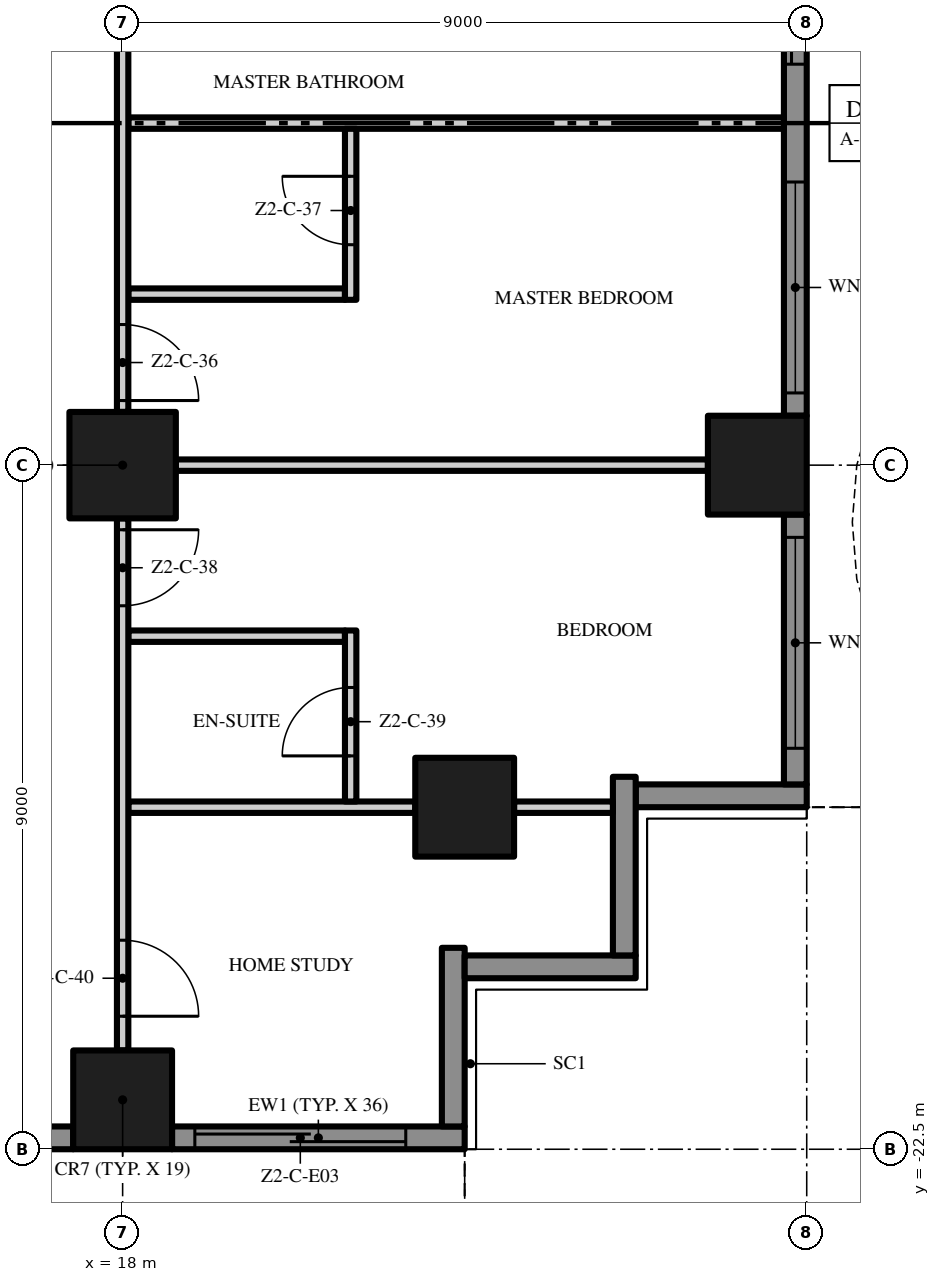
"""IFC4 building model, lengths in metres.
Left out: names, types, materials, properties, quantities, classifications, styles, units other than length and angle.
Written with IfcOpenShell. Run it as: python <this file> out.ifc"""

import sys

from ifc_helpers import new_model, si_unit, direction, frame, frame_2d, origin, origin_2d, place, context, subcontext, project, spatial, polyline, rectangle, outline, extrude, element, fill, save


model = new_model("IFC4")
c1 = context("Model", 3, precision=1e-05, world=origin(), true_north=direction((0.0, 1.0)))
c2 = subcontext(c1, "Body", "Model", "MODEL_VIEW")
j1 = project(units=[si_unit("LENGTHUNIT", "METRE"), si_unit("PLANEANGLEUNIT", "RADIAN")], contexts=[c1])
p1 = place(None, origin())
s1 = spatial("IfcSite", under=j1, at=p1, CompositionType="ELEMENT")
p2 = place(p1, origin())
s2 = spatial("IfcBuilding", under=s1, at=p2, CompositionType="ELEMENT")
p3 = place(p2, frame((0.0, 0.0, 92.2)))
s3 = spatial("IfcBuildingStorey", under=s2, at=p3, CompositionType="ELEMENT", Elevation=92.2)
p4 = place(p3, frame((18.0, -13.5, 0.0), z_axis=(0.0, 0.0, 1.0), x_axis=(1.0, 0.0, 0.0)))
e1 = element("IfcColumn", 1, at=p4, inside=s3, PredefinedType="COLUMN", context=c2, shape_type="SweptSolid", body=[
    extrude(rectangle(XDim=1.4, YDim=1.4, at=origin_2d()), origin(), (0.0, 0.0, 1.0), 3.5),
])
for number, where, z_axis, x_axis in (
    (2, (18.0, -21.85, 0.0), (0.0, 0.0, 1.0), (1.0, 0.0, 0.0)),
    (3, (26.35, -13.5, 0.0), (0.0, 0.0, 1.0), (1.0, 0.0, 0.0)),
    (4, (22.5, -18.0, 0.0), (0.0, 0.0, 1.0), (1.0, 0.0, 0.0)),
):
    element("IfcColumn", number, at=place(p3, frame(where, z_axis=z_axis, x_axis=x_axis)), inside=s3, PredefinedType="COLUMN", context=c2, shape_type="SweptSolid", body=[
        extrude(rectangle(XDim=1.3, YDim=1.3, at=origin_2d()), origin(), (0.0, 0.0, 1.0), 3.5),
    ])
p5 = place(p3, frame((17.35, -22.35, 0.0), z_axis=(0.0, 0.0, 1.0), x_axis=(-1.0, 0.0, 0.0)))
e5 = element("IfcWall", 5, at=p5, inside=s3, PredefinedType="SOLIDWALL", context=c2, shape_type="SweptSolid", body=[
    extrude(rectangle(XDim=7.7, YDim=0.3, at=frame_2d((3.85, 0.0))), origin(), (0.0, 0.0, 1.0), 3.5),
])
p6 = place(p5, frame((4.625, 0.0, 0.45)))
e6 = element("IfcOpeningElement", 6, at=p6, cuts=e5, PredefinedType="OPENING", context=c2, shape_type="SweptSolid", body=[
    extrude(rectangle(XDim=2.775, YDim=2.65, at=frame_2d((1.387, 1.325))), frame((0.0, 0.16, 0.0), z_axis=(0.0, -1.0, 0.0), x_axis=(1.0, 0.0, 0.0)), (0.0, 0.0, 1.0), 0.32),
])
p7 = place(p5, frame((0.3, 0.0, 0.45)))
e7 = element("IfcOpeningElement", 7, at=p7, cuts=e5, PredefinedType="OPENING", context=c2, shape_type="SweptSolid", body=[
    extrude(rectangle(XDim=2.775, YDim=2.65, at=frame_2d((1.387, 1.325))), frame((0.0, 0.16, 0.0), z_axis=(0.0, -1.0, 0.0), x_axis=(1.0, 0.0, 0.0)), (0.0, 0.0, 1.0), 0.32),
])
p8 = place(p3, frame((22.5, -22.35, 0.0), z_axis=(0.0, 0.0, 1.0), x_axis=(-1.0, 0.0, 0.0)))
e8 = element("IfcWall", 8, at=p8, inside=s3, PredefinedType="SOLIDWALL", context=c2, shape_type="SweptSolid", body=[
    extrude(rectangle(XDim=3.85, YDim=0.3, at=frame_2d((1.925, 0.0))), origin(), (0.0, 0.0, 1.0), 3.5),
])
p9 = place(p8, frame((0.775, 0.0, 0.0)))
e9 = element("IfcOpeningElement", 9, at=p9, cuts=e8, PredefinedType="OPENING", context=c2, shape_type="SweptSolid", body=[
    extrude(rectangle(XDim=2.775, YDim=2.4, at=frame_2d((1.387, 1.2))), frame((0.0, 0.16, 0.0), z_axis=(0.0, -1.0, 0.0), x_axis=(1.0, 0.0, 0.0)), (0.0, 0.0, 1.0), 0.32),
])
p10 = place(p3, frame((22.35, -19.85, 0.0), z_axis=(0.0, 0.0, 1.0), x_axis=(0.0, -1.0, 0.0)))
e10 = element("IfcWall", 10, at=p10, inside=s3, PredefinedType="SOLIDWALL", context=c2, shape_type="SweptSolid", body=[
    extrude(rectangle(XDim=2.35, YDim=0.3, at=frame_2d((1.175, 0.0))), origin(), (0.0, 0.0, 1.0), 3.5),
])
p11 = place(p3, frame((24.75, -20.1, 0.0), z_axis=(0.0, 0.0, 1.0), x_axis=(-1.0, 0.0, 0.0)))
e11 = element("IfcWall", 11, at=p11, inside=s3, PredefinedType="SOLIDWALL", context=c2, shape_type="SweptSolid", body=[
    extrude(rectangle(XDim=2.25, YDim=0.3, at=frame_2d((1.125, 0.0))), origin(), (0.0, 0.0, 1.0), 3.5),
])
p12 = place(p3, frame((24.6, -17.6, 0.0), z_axis=(0.0, 0.0, 1.0), x_axis=(0.0, -1.0, 0.0)))
e12 = element("IfcWall", 12, at=p12, inside=s3, PredefinedType="SOLIDWALL", context=c2, shape_type="SweptSolid", body=[
    extrude(rectangle(XDim=2.35, YDim=0.3, at=frame_2d((1.175, 0.0))), origin(), (0.0, 0.0, 1.0), 3.5),
])
p13 = place(p3, frame((27.0, -17.85, 0.0), z_axis=(0.0, 0.0, 1.0), x_axis=(-1.0, 0.0, 0.0)))
e13 = element("IfcWall", 13, at=p13, inside=s3, PredefinedType="SOLIDWALL", context=c2, shape_type="SweptSolid", body=[
    extrude(rectangle(XDim=2.25, YDim=0.3, at=frame_2d((1.125, 0.0))), origin(), (0.0, 0.0, 1.0), 3.5),
])
p14 = place(p3, frame((26.85, -14.15, 0.0), z_axis=(0.0, 0.0, 1.0), x_axis=(0.0, -1.0, 0.0)))
e14 = element("IfcWall", 14, at=p14, inside=s3, PredefinedType="SOLIDWALL", context=c2, shape_type="SweptSolid", body=[
    extrude(rectangle(XDim=3.55, YDim=0.3, at=frame_2d((1.775, 0.0))), origin(), (0.0, 0.0, 1.0), 3.5),
])
p15 = place(p14, frame((0.3, 0.0, 0.45)))
e15 = element("IfcOpeningElement", 15, at=p15, cuts=e14, PredefinedType="OPENING", context=c2, shape_type="SweptSolid", body=[
    extrude(rectangle(XDim=2.775, YDim=2.65, at=frame_2d((1.387, 1.325))), frame((0.0, 0.16, 0.0), z_axis=(0.0, -1.0, 0.0), x_axis=(1.0, 0.0, 0.0)), (0.0, 0.0, 1.0), 0.32),
])
p16 = place(p3, frame((26.85, -5.15, 0.0), z_axis=(0.0, 0.0, 1.0), x_axis=(0.0, -1.0, 0.0)))
e16 = element("IfcWall", 16, at=p16, inside=s3, PredefinedType="SOLIDWALL", context=c2, shape_type="SweptSolid", body=[
    extrude(rectangle(XDim=7.7, YDim=0.3, at=frame_2d((3.85, 0.0))), origin(), (0.0, 0.0, 1.0), 3.5),
])
p17 = place(p16, frame((4.625, 0.0, 0.45)))
e17 = element("IfcOpeningElement", 17, at=p17, cuts=e16, PredefinedType="OPENING", context=c2, shape_type="SweptSolid", body=[
    extrude(rectangle(XDim=2.775, YDim=2.65, at=frame_2d((1.387, 1.325))), frame((0.0, 0.16, 0.0), z_axis=(0.0, -1.0, 0.0), x_axis=(1.0, 0.0, 0.0)), (0.0, 0.0, 1.0), 0.32),
])
p18 = place(p16, frame((0.3, 0.0, 0.0)))
e18 = element("IfcOpeningElement", 18, at=p18, cuts=e16, PredefinedType="OPENING", context=c2, shape_type="SweptSolid", body=[
    extrude(rectangle(XDim=2.775, YDim=2.4, at=frame_2d((1.387, 1.2))), frame((0.0, 0.16, 0.0), z_axis=(0.0, -1.0, 0.0), x_axis=(1.0, 0.0, 0.0)), (0.0, 0.0, 1.0), 0.32),
])
p19 = place(p3, origin())
e19 = element("IfcWall", 19, at=p19, inside=s3, PredefinedType="USERDEFINED", context=c2, shape_type="SweptSolid", body=[
    extrude(outline(polyline([(-22.5, -24.3), (-21.0, -23.595), (-19.5, -23.159), (-18.75, -23.1), (-18.0, -23.159), (-16.5, -23.595), (-15.0, -24.3), (-13.5, -25.005), (-12.0, -25.441), (-11.25, -25.5), (-10.5, -25.441), (-9.0, -25.005), (-7.5, -24.3), (-6.0, -23.595), (-4.5, -23.159), (-3.75, -23.1), (-3.0, -23.159), (-1.5, -23.595), (0.0, -24.3), (1.5, -25.005), (3.0, -25.441), (3.75, -25.5), (4.5, -25.441), (6.0, -25.005), (7.5, -24.3), (9.0, -23.595), (10.5, -23.159), (11.25, -23.1), (12.0, -23.159), (13.5, -23.595), (15.0, -24.3), (16.5, -25.005), (18.0, -25.441), (18.75, -25.5), (19.5, -25.441), (21.0, -25.005), (22.5, -24.3), (22.394, -24.074), (20.911, -24.771), (19.455, -25.194), (18.75, -25.249), (18.045, -25.194), (16.589, -24.771), (15.106, -24.074), (13.589, -23.36), (12.045, -22.911), (11.25, -22.849), (10.455, -22.911), (8.911, -23.36), (7.394, -24.074), (5.911, -24.771), (4.455, -25.194), (3.75, -25.249), (3.045, -25.194), (1.589, -24.771), (0.106, -24.074), (-1.411, -23.36), (-2.955, -22.911), (-3.75, -22.849), (-4.545, -22.911), (-6.089, -23.36), (-7.606, -24.074), (-9.089, -24.771), (-10.545, -25.194), (-11.25, -25.249), (-11.955, -25.194), (-13.411, -24.771), (-14.894, -24.074), (-16.411, -23.36), (-17.955, -22.911), (-18.75, -22.849), (-19.545, -22.911), (-21.089, -23.36), (-22.606, -24.074), (-22.5, -24.3)])), origin(), (0.0, 0.0, 1.0), 0.9),
])
p20 = place(p3, origin())
e20 = element("IfcWall", 20, at=p20, inside=s3, PredefinedType="USERDEFINED", context=c2, shape_type="SweptSolid", body=[
    extrude(outline(polyline([(28.8, -18.0), (28.095, -16.5), (27.659, -15.0), (27.6, -14.25), (27.659, -13.5), (28.095, -12.0), (28.8, -10.5), (29.505, -9.0), (29.941, -7.5), (30.0, -6.75), (29.941, -6.0), (29.505, -4.5), (28.8, -3.0), (28.095, -1.5), (27.659, 0.0), (27.6, 0.75), (27.659, 1.5), (28.095, 3.0), (28.8, 4.5), (29.505, 6.0), (29.941, 7.5), (30.0, 8.25), (29.941, 9.0), (29.505, 10.5), (28.8, 12.0), (28.095, 13.5), (27.659, 15.0), (27.6, 15.75), (27.659, 16.5), (28.095, 18.0), (27.855, 18.07), (27.411, 16.545), (27.349, 15.75), (27.411, 14.955), (27.86, 13.411), (28.574, 11.894), (29.271, 10.411), (29.694, 8.955), (29.749, 8.25), (29.694, 7.545), (29.271, 6.089), (28.574, 4.606), (27.86, 3.089), (27.411, 1.545), (27.349, 0.75), (27.411, -0.045), (27.86, -1.589), (28.574, -3.106), (29.271, -4.589), (29.694, -6.045), (29.749, -6.75), (29.694, -7.455), (29.271, -8.911), (28.574, -10.394), (27.86, -11.911), (27.411, -13.455), (27.349, -14.25), (27.411, -15.045), (27.86, -16.589), (28.574, -18.106), (28.8, -18.0)])), origin(), (0.0, 0.0, 1.0), 0.9),
])
p21 = place(p3, frame((18.075, -18.0, 0.0), z_axis=(0.0, 0.0, 1.0), x_axis=(1.0, 0.0, 0.0)))
e21 = element("IfcWall", 21, at=p21, inside=s3, PredefinedType="PARTITIONING", context=c2, shape_type="SweptSolid", body=[
    extrude(rectangle(XDim=3.775, YDim=0.15, at=frame_2d((1.887, 0.0))), origin(), (0.0, 0.0, 1.0), 3.5),
])
p22 = place(p3, frame((23.15, -18.0, 0.0), z_axis=(0.0, 0.0, 1.0), x_axis=(1.0, 0.0, 0.0)))
e22 = element("IfcWall", 22, at=p22, inside=s3, PredefinedType="PARTITIONING", context=c2, shape_type="SweptSolid", body=[
    extrude(rectangle(XDim=1.3, YDim=0.15, at=frame_2d((0.65, 0.0))), origin(), (0.0, 0.0, 1.0), 3.5),
])
p23 = place(p3, frame((18.075, -15.75, 0.0), z_axis=(0.0, 0.0, 1.0), x_axis=(1.0, 0.0, 0.0)))
e23 = element("IfcWall", 23, at=p23, inside=s3, PredefinedType="PARTITIONING", context=c2, shape_type="SweptSolid", body=[
    extrude(rectangle(XDim=2.85, YDim=0.15, at=frame_2d((1.425, 0.0))), origin(), (0.0, 0.0, 1.0), 3.5),
])
p24 = place(p3, frame((18.7, -13.5, 0.0), z_axis=(0.0, 0.0, 1.0), x_axis=(1.0, 0.0, 0.0)))
e24 = element("IfcWall", 24, at=p24, inside=s3, PredefinedType="PARTITIONING", context=c2, shape_type="SweptSolid", body=[
    extrude(rectangle(XDim=7.0, YDim=0.15, at=frame_2d((3.5, 0.0))), origin(), (0.0, 0.0, 1.0), 3.5),
])
p25 = place(p3, frame((18.075, -11.25, 0.0), z_axis=(0.0, 0.0, 1.0), x_axis=(1.0, 0.0, 0.0)))
e25 = element("IfcWall", 25, at=p25, inside=s3, PredefinedType="PARTITIONING", context=c2, shape_type="SweptSolid", body=[
    extrude(rectangle(XDim=2.85, YDim=0.15, at=frame_2d((1.425, 0.0))), origin(), (0.0, 0.0, 1.0), 3.5),
])
p26 = place(p3, frame((18.075, -9.0, 0.0), z_axis=(0.0, 0.0, 1.0), x_axis=(1.0, 0.0, 0.0)))
e26 = element("IfcWall", 26, at=p26, inside=s3, PredefinedType="PARTITIONING", context=c2, shape_type="SweptSolid", body=[
    extrude(rectangle(XDim=8.625, YDim=0.15, at=frame_2d((4.312, 0.0))), origin(), (0.0, 0.0, 1.0), 3.5),
])
p27 = place(p3, frame((18.0, -14.2, 0.0), z_axis=(0.0, 0.0, 1.0), x_axis=(0.0, -1.0, 0.0)))
e27 = element("IfcWall", 27, at=p27, inside=s3, PredefinedType="PARTITIONING", context=c2, shape_type="SweptSolid", body=[
    extrude(rectangle(XDim=7.0, YDim=0.15, at=frame_2d((3.5, 0.0))), origin(), (0.0, 0.0, 1.0), 3.5),
])
p28 = place(p27, frame((0.15, 0.0, 0.0)))
e28 = element("IfcOpeningElement", 28, at=p28, cuts=e27, PredefinedType="OPENING", context=c2, shape_type="SweptSolid", body=[
    extrude(rectangle(XDim=1.0, YDim=2.4, at=frame_2d((0.5, 1.2))), frame((0.0, 0.085, 0.0), z_axis=(0.0, -1.0, 0.0), x_axis=(1.0, 0.0, 0.0)), (0.0, 0.0, 1.0), 0.17),
])
p29 = place(p27, frame((5.55, 0.0, 0.0)))
e29 = element("IfcOpeningElement", 29, at=p29, cuts=e27, PredefinedType="OPENING", context=c2, shape_type="SweptSolid", body=[
    extrude(rectangle(XDim=1.0, YDim=2.4, at=frame_2d((0.5, 1.2))), frame((0.0, 0.085, 0.0), z_axis=(0.0, -1.0, 0.0), x_axis=(1.0, 0.0, 0.0)), (0.0, 0.0, 1.0), 0.17),
])
p30 = place(p3, frame((18.0, -5.2, 0.0), z_axis=(0.0, 0.0, 1.0), x_axis=(0.0, -1.0, 0.0)))
e30 = element("IfcWall", 30, at=p30, inside=s3, PredefinedType="PARTITIONING", context=c2, shape_type="SweptSolid", body=[
    extrude(rectangle(XDim=7.6, YDim=0.15, at=frame_2d((3.8, 0.0))), origin(), (0.0, 0.0, 1.0), 3.5),
])
p31 = place(p30, frame((0.15, 0.0, 0.0)))
e31 = element("IfcOpeningElement", 31, at=p31, cuts=e30, PredefinedType="OPENING", context=c2, shape_type="SweptSolid", body=[
    extrude(rectangle(XDim=1.8, YDim=2.4, at=frame_2d((0.9, 1.2))), frame((0.0, 0.085, 0.0), z_axis=(0.0, -1.0, 0.0), x_axis=(1.0, 0.0, 0.0)), (0.0, 0.0, 1.0), 0.17),
])
p32 = place(p30, frame((6.45, 0.0, 0.0)))
e32 = element("IfcOpeningElement", 32, at=p32, cuts=e30, PredefinedType="OPENING", context=c2, shape_type="SweptSolid", body=[
    extrude(rectangle(XDim=1.0, YDim=2.4, at=frame_2d((0.5, 1.2))), frame((0.0, 0.085, 0.0), z_axis=(0.0, -1.0, 0.0), x_axis=(1.0, 0.0, 0.0)), (0.0, 0.0, 1.0), 0.17),
])
p33 = place(p3, frame((21.0, -17.925, 0.0), z_axis=(0.0, 0.0, 1.0), x_axis=(0.0, 1.0, 0.0)))
e33 = element("IfcWall", 33, at=p33, inside=s3, PredefinedType="PARTITIONING", context=c2, shape_type="SweptSolid", body=[
    extrude(rectangle(XDim=2.25, YDim=0.15, at=frame_2d((1.125, 0.0))), origin(), (0.0, 0.0, 1.0), 3.5),
])
p34 = place(p33, frame((0.6, 0.0, 0.0)))
e34 = element("IfcOpeningElement", 34, at=p34, cuts=e33, PredefinedType="OPENING", context=c2, shape_type="SweptSolid", body=[
    extrude(rectangle(XDim=0.9, YDim=2.1, at=frame_2d((0.45, 1.05))), frame((0.0, 0.085, 0.0), z_axis=(0.0, -1.0, 0.0), x_axis=(1.0, 0.0, 0.0)), (0.0, 0.0, 1.0), 0.17),
])
p35 = place(p3, frame((21.0, -11.325, 0.0), z_axis=(0.0, 0.0, 1.0), x_axis=(0.0, 1.0, 0.0)))
e35 = element("IfcWall", 35, at=p35, inside=s3, PredefinedType="PARTITIONING", context=c2, shape_type="SweptSolid", body=[
    extrude(rectangle(XDim=2.25, YDim=0.15, at=frame_2d((1.125, 0.0))), origin(), (0.0, 0.0, 1.0), 3.5),
])
p36 = place(p35, frame((0.725, 0.0, 0.0)))
e36 = element("IfcOpeningElement", 36, at=p36, cuts=e35, PredefinedType="OPENING", context=c2, shape_type="SweptSolid", body=[
    extrude(rectangle(XDim=0.9, YDim=2.1, at=frame_2d((0.45, 1.05))), frame((0.0, 0.085, 0.0), z_axis=(0.0, -1.0, 0.0), x_axis=(1.0, 0.0, 0.0)), (0.0, 0.0, 1.0), 0.17),
])
p37 = place(p9, origin())
e37 = element("IfcDoor", 37, at=p37, inside=s3, OperationType="SINGLE_SWING_LEFT", PredefinedType="DOOR", context=c2, shape_type="SweptSolid", body=[
    extrude(rectangle(XDim=2.775, YDim=2.4, at=frame_2d((1.387, 1.2))), frame((0.0, 0.025, 0.0), z_axis=(0.0, -1.0, 0.0), x_axis=(1.0, 0.0, 0.0)), (0.0, 0.0, 1.0), 0.05),
])
fill(e9, e37)
p38 = place(p15, origin())
e38 = element("IfcWindow", 38, at=p38, inside=s3, PartitioningType="SINGLE_PANEL", PredefinedType="WINDOW", context=c2, shape_type="SweptSolid", body=[
    extrude(rectangle(XDim=2.775, YDim=2.65, at=frame_2d((1.387, 1.325))), frame((0.0, 0.03, 0.0), z_axis=(0.0, -1.0, 0.0), x_axis=(1.0, 0.0, 0.0)), (0.0, 0.0, 1.0), 0.06),
])
fill(e15, e38)
p39 = place(p17, origin())
e39 = element("IfcWindow", 39, at=p39, inside=s3, PartitioningType="SINGLE_PANEL", PredefinedType="WINDOW", context=c2, shape_type="SweptSolid", body=[
    extrude(rectangle(XDim=2.775, YDim=2.65, at=frame_2d((1.387, 1.325))), frame((0.0, 0.03, 0.0), z_axis=(0.0, -1.0, 0.0), x_axis=(1.0, 0.0, 0.0)), (0.0, 0.0, 1.0), 0.06),
])
fill(e17, e39)
p40 = place(p18, origin())
e40 = element("IfcDoor", 40, at=p40, inside=s3, OperationType="SINGLE_SWING_LEFT", PredefinedType="DOOR", context=c2, shape_type="SweptSolid", body=[
    extrude(rectangle(XDim=2.775, YDim=2.4, at=frame_2d((1.387, 1.2))), frame((0.0, 0.025, 0.0), z_axis=(0.0, -1.0, 0.0), x_axis=(1.0, 0.0, 0.0)), (0.0, 0.0, 1.0), 0.05),
])
fill(e18, e40)
p41 = place(p32, origin())
e41 = element("IfcDoor", 41, at=p41, inside=s3, OperationType="SINGLE_SWING_RIGHT", PredefinedType="DOOR", context=c2, shape_type="SweptSolid", body=[
    extrude(rectangle(XDim=1.0, YDim=2.4, at=frame_2d((0.5, 1.2))), frame((0.0, 0.025, 0.0), z_axis=(0.0, -1.0, 0.0), x_axis=(1.0, 0.0, 0.0)), (0.0, 0.0, 1.0), 0.05),
])
fill(e32, e41)
p42 = place(p36, origin())
e42 = element("IfcDoor", 42, at=p42, inside=s3, OperationType="SINGLE_SWING_RIGHT", PredefinedType="DOOR", context=c2, shape_type="SweptSolid", body=[
    extrude(rectangle(XDim=0.9, YDim=2.1, at=frame_2d((0.45, 1.05))), frame((0.0, 0.025, 0.0), z_axis=(0.0, -1.0, 0.0), x_axis=(1.0, 0.0, 0.0)), (0.0, 0.0, 1.0), 0.05),
])
fill(e36, e42)
p43 = place(p28, origin())
e43 = element("IfcDoor", 43, at=p43, inside=s3, OperationType="SINGLE_SWING_LEFT", PredefinedType="DOOR", context=c2, shape_type="SweptSolid", body=[
    extrude(rectangle(XDim=1.0, YDim=2.4, at=frame_2d((0.5, 1.2))), frame((0.0, 0.025, 0.0), z_axis=(0.0, -1.0, 0.0), x_axis=(1.0, 0.0, 0.0)), (0.0, 0.0, 1.0), 0.05),
])
fill(e28, e43)
p44 = place(p34, origin())
e44 = element("IfcDoor", 44, at=p44, inside=s3, OperationType="SINGLE_SWING_LEFT", PredefinedType="DOOR", context=c2, shape_type="SweptSolid", body=[
    extrude(rectangle(XDim=0.9, YDim=2.1, at=frame_2d((0.45, 1.05))), frame((0.0, 0.025, 0.0), z_axis=(0.0, -1.0, 0.0), x_axis=(1.0, 0.0, 0.0)), (0.0, 0.0, 1.0), 0.05),
])
fill(e34, e44)
p45 = place(p29, origin())
e45 = element("IfcDoor", 45, at=p45, inside=s3, OperationType="SINGLE_SWING_RIGHT", PredefinedType="DOOR", context=c2, shape_type="SweptSolid", body=[
    extrude(rectangle(XDim=1.0, YDim=2.4, at=frame_2d((0.5, 1.2))), frame((0.0, 0.025, 0.0), z_axis=(0.0, -1.0, 0.0), x_axis=(1.0, 0.0, 0.0)), (0.0, 0.0, 1.0), 0.05),
])
fill(e29, e45)
save(model, sys.argv[1])
